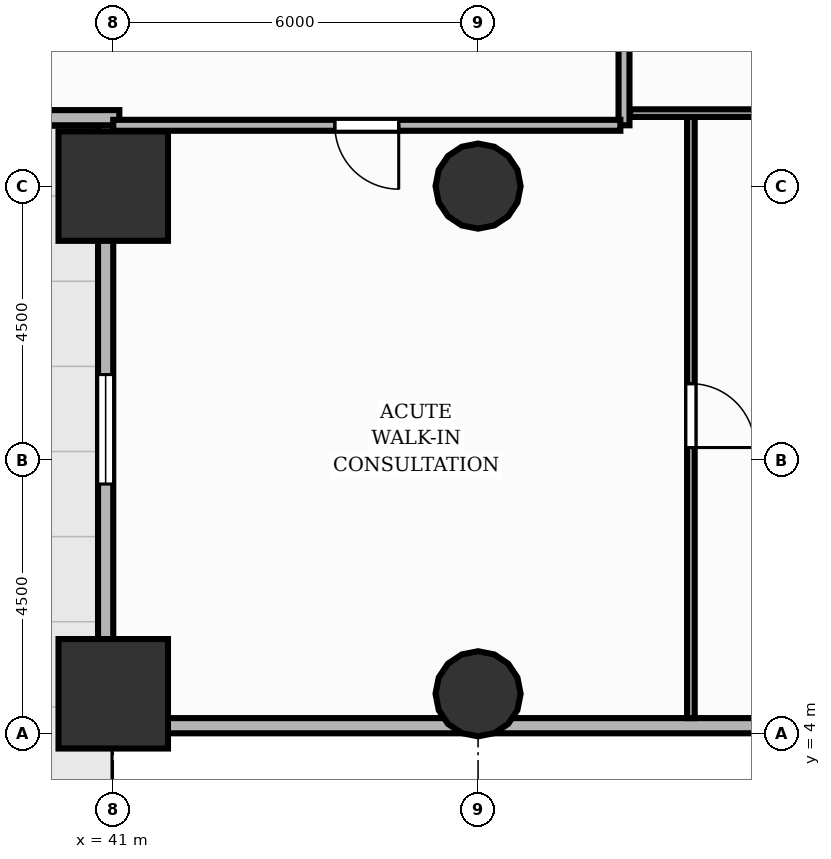
"""IFC4 building model, lengths in metres.
Left out: names, types, materials, properties, quantities, classifications, styles, units other than length and angle.
Written with IfcOpenShell. Run it as: python <this file> out.ifc"""

import sys

from ifc_helpers import new_model, si_unit, direction, frame, frame_2d, origin, origin_2d, place, context, subcontext, project, spatial, rectangle, circle, extrude, element, fill, save


model = new_model("IFC4")
c1 = context("Model", 3, precision=1e-05, world=origin(), true_north=direction((0.0, 1.0)))
c2 = subcontext(c1, "Body", "Model", "MODEL_VIEW")
j1 = project(units=[si_unit("LENGTHUNIT", "METRE"), si_unit("PLANEANGLEUNIT", "RADIAN")], contexts=[c1])
p1 = place(None, origin())
s1 = spatial("IfcSite", under=j1, at=p1, CompositionType="ELEMENT")
p2 = place(p1, origin())
s2 = spatial("IfcBuilding", under=s1, at=p2, CompositionType="ELEMENT")
p3 = place(p2, origin())
s3 = spatial("IfcBuildingStorey", under=s2, at=p3, CompositionType="ELEMENT", Elevation=0.0)
for number, where, z_axis, x_axis in (
    (1, (47.0, 4.65, 0.0), (0.0, 0.0, 1.0), (1.0, 0.0, 0.0)),
    (2, (47.0, 13.0, 0.0), (0.0, 0.0, 1.0), (1.0, 0.0, 0.0)),
):
    element("IfcColumn", number, at=place(p3, frame(where, z_axis=z_axis, x_axis=x_axis)), inside=s3, PredefinedType="COLUMN", context=c2, shape_type="SweptSolid", body=[
        extrude(circle(Radius=0.7, at=origin_2d()), origin(), (0.0, 0.0, 1.0), 4.0),
    ])
for number, where, z_axis, x_axis in (
    (3, (41.0, 4.65, 0.0), (0.0, 0.0, 1.0), (1.0, 0.0, 0.0)),
    (4, (41.0, 13.0, 0.0), (0.0, 0.0, 1.0), (1.0, 0.0, 0.0)),
):
    element("IfcColumn", number, at=place(p3, frame(where, z_axis=z_axis, x_axis=x_axis)), inside=s3, PredefinedType="COLUMN", context=c2, shape_type="SweptSolid", body=[
        extrude(rectangle(XDim=1.8, YDim=1.8, at=origin_2d()), origin(), (0.0, 0.0, 1.0), 4.0),
    ])
p4 = place(p3, frame((55.1, 4.125, 0.0), z_axis=(0.0, 0.0, 1.0), x_axis=(-1.0, 0.0, 0.0)))
e5 = element("IfcWall", 5, at=p4, inside=s3, PredefinedType="SOLIDWALL", context=c2, shape_type="SweptSolid", body=[
    extrude(rectangle(XDim=14.2, YDim=0.25, at=frame_2d((7.1, 0.0))), origin(), (0.0, 0.0, 1.0), 3.72),
])
p5 = place(p3, frame((40.875, 14.1, 0.0), z_axis=(0.0, 0.0, 1.0), x_axis=(0.0, -1.0, 0.0)))
e6 = element("IfcWall", 6, at=p5, inside=s3, PredefinedType="SOLIDWALL", context=c2, shape_type="SweptSolid", body=[
    extrude(rectangle(XDim=10.2, YDim=0.25, at=frame_2d((5.1, 0.0))), origin(), (0.0, 0.0, 1.0), 3.178),
])
p6 = place(p5, frame((4.2, 0.0, 0.9)))
e7 = element("IfcOpeningElement", 7, at=p6, cuts=e6, PredefinedType="OPENING", context=c2, shape_type="SweptSolid", body=[
    extrude(rectangle(XDim=1.8, YDim=1.8, at=frame_2d((0.9, 0.9))), frame((0.0, 0.135, 0.0), z_axis=(0.0, -1.0, 0.0), x_axis=(1.0, 0.0, 0.0)), (0.0, 0.0, 1.0), 0.27),
])
p7 = place(p3, frame((41.1, 14.125, 0.0), z_axis=(0.0, 0.0, 1.0), x_axis=(-1.0, 0.0, 0.0)))
e8 = element("IfcWall", 8, at=p7, inside=s3, PredefinedType="SOLIDWALL", context=c2, shape_type="SweptSolid", body=[
    extrude(rectangle(XDim=18.2, YDim=0.25, at=frame_2d((9.1, 0.0))), origin(), (0.0, 0.0, 1.0), 3.72),
])
p8 = place(p7, frame((11.15, 0.0, 0.0)))
e9 = element("IfcOpeningElement", 9, at=p8, cuts=e8, PredefinedType="OPENING", context=c2, shape_type="SweptSolid", body=[
    extrude(rectangle(XDim=1.8, YDim=2.3, at=frame_2d((0.9, 1.15))), frame((0.0, 0.135, 0.0), z_axis=(0.0, -1.0, 0.0), x_axis=(1.0, 0.0, 0.0)), (0.0, 0.0, 1.0), 0.27),
])
p9 = place(p7, frame((2.6, 0.0, 0.0)))
e10 = element("IfcOpeningElement", 10, at=p9, cuts=e8, PredefinedType="OPENING", context=c2, shape_type="SweptSolid", body=[
    extrude(rectangle(XDim=1.8, YDim=2.3, at=frame_2d((0.9, 1.15))), frame((0.0, 0.135, 0.0), z_axis=(0.0, -1.0, 0.0), x_axis=(1.0, 0.0, 0.0)), (0.0, 0.0, 1.0), 0.27),
])
p10 = place(p7, frame((6.2, 0.0, 0.0)))
e11 = element("IfcOpeningElement", 11, at=p10, cuts=e8, PredefinedType="OPENING", context=c2, shape_type="SweptSolid", body=[
    extrude(rectangle(XDim=1.8, YDim=2.3, at=frame_2d((0.9, 1.15))), frame((0.0, 0.135, 0.0), z_axis=(0.0, -1.0, 0.0), x_axis=(1.0, 0.0, 0.0)), (0.0, 0.0, 1.0), 0.27),
])
p11 = place(p3, frame((49.4, 16.6, 0.0), z_axis=(0.0, 0.0, 1.0), x_axis=(0.0, -1.0, 0.0)))
e12 = element("IfcWall", 12, at=p11, inside=s3, PredefinedType="PARTITIONING", context=c2, shape_type="SweptSolid", body=[
    extrude(rectangle(XDim=2.6, YDim=0.18, at=frame_2d((1.3, 0.0))), origin(), (0.0, 0.0, 1.0), 3.715),
])
p12 = place(p3, frame((49.34, 14.0, 0.0), z_axis=(0.0, 0.0, 1.0), x_axis=(-1.0, 0.0, 0.0)))
e13 = element("IfcWall", 13, at=p12, inside=s3, PredefinedType="PARTITIONING", context=c2, shape_type="SweptSolid", body=[
    extrude(rectangle(XDim=8.34, YDim=0.18, at=frame_2d((4.17, 0.0))), origin(), (0.0, 0.0, 1.0), 3.715),
])
p13 = place(p12, frame((3.645, 0.0, 0.0)))
e14 = element("IfcOpeningElement", 14, at=p13, cuts=e13, PredefinedType="OPENING", context=c2, shape_type="SweptSolid", body=[
    extrude(rectangle(XDim=1.05, YDim=2.15, at=frame_2d((0.525, 1.075))), frame((0.0, 0.1, 0.0), z_axis=(0.0, -1.0, 0.0), x_axis=(1.0, 0.0, 0.0)), (0.0, 0.0, 1.0), 0.2),
])
p14 = place(p3, frame((50.5, 14.2, 0.0), z_axis=(0.0, 0.0, 1.0), x_axis=(0.0, -1.0, 0.0)))
e15 = element("IfcWall", 15, at=p14, inside=s3, PredefinedType="PARTITIONING", context=c2, shape_type="SweptSolid", body=[
    extrude(rectangle(XDim=9.95, YDim=0.125, at=frame_2d((4.975, 0.0))), origin(), (0.0, 0.0, 1.0), 3.715),
])
p15 = place(p14, frame((4.45, 0.0, 0.0)))
e16 = element("IfcOpeningElement", 16, at=p15, cuts=e15, PredefinedType="OPENING", context=c2, shape_type="SweptSolid", body=[
    extrude(rectangle(XDim=1.05, YDim=2.15, at=frame_2d((0.525, 1.075))), frame((0.0, 0.073, 0.0), z_axis=(0.0, -1.0, 0.0), x_axis=(1.0, 0.0, 0.0)), (0.0, 0.0, 1.0), 0.145),
])
p16 = place(p3, frame((49.5, 14.2, 0.0), z_axis=(0.0, 0.0, 1.0), x_axis=(1.0, 0.0, 0.0)))
e17 = element("IfcWall", 17, at=p16, inside=s3, PredefinedType="PARTITIONING", context=c2, shape_type="SweptSolid", body=[
    extrude(rectangle(XDim=10.25, YDim=0.125, at=frame_2d((5.125, 0.0))), origin(), (0.0, 0.0, 1.0), 3.715),
])
p17 = place(p6, origin())
e18 = element("IfcWindow", 18, at=p17, inside=s3, PartitioningType="SINGLE_PANEL", PredefinedType="WINDOW", context=c2, shape_type="SweptSolid", body=[
    extrude(rectangle(XDim=1.8, YDim=1.8, at=frame_2d((0.9, 0.9))), frame((0.0, 0.03, 0.0), z_axis=(0.0, -1.0, 0.0), x_axis=(1.0, 0.0, 0.0)), (0.0, 0.0, 1.0), 0.06),
])
fill(e7, e18)
p18 = place(p13, origin())
e19 = element("IfcDoor", 19, at=p18, inside=s3, OperationType="SINGLE_SWING_LEFT", PredefinedType="DOOR", context=c2, shape_type="SweptSolid", body=[
    extrude(rectangle(XDim=1.05, YDim=2.15, at=frame_2d((0.525, 1.075))), frame((0.0, 0.025, 0.0), z_axis=(0.0, -1.0, 0.0), x_axis=(1.0, 0.0, 0.0)), (0.0, 0.0, 1.0), 0.05),
])
fill(e14, e19)
p19 = place(p15, origin())
e20 = element("IfcDoor", 20, at=p19, inside=s3, OperationType="SINGLE_SWING_RIGHT", PredefinedType="DOOR", context=c2, shape_type="SweptSolid", body=[
    extrude(rectangle(XDim=1.05, YDim=2.15, at=frame_2d((0.525, 1.075))), frame((0.0, 0.025, 0.0), z_axis=(0.0, -1.0, 0.0), x_axis=(1.0, 0.0, 0.0)), (0.0, 0.0, 1.0), 0.05),
])
fill(e16, e20)
save(model, sys.argv[1])
